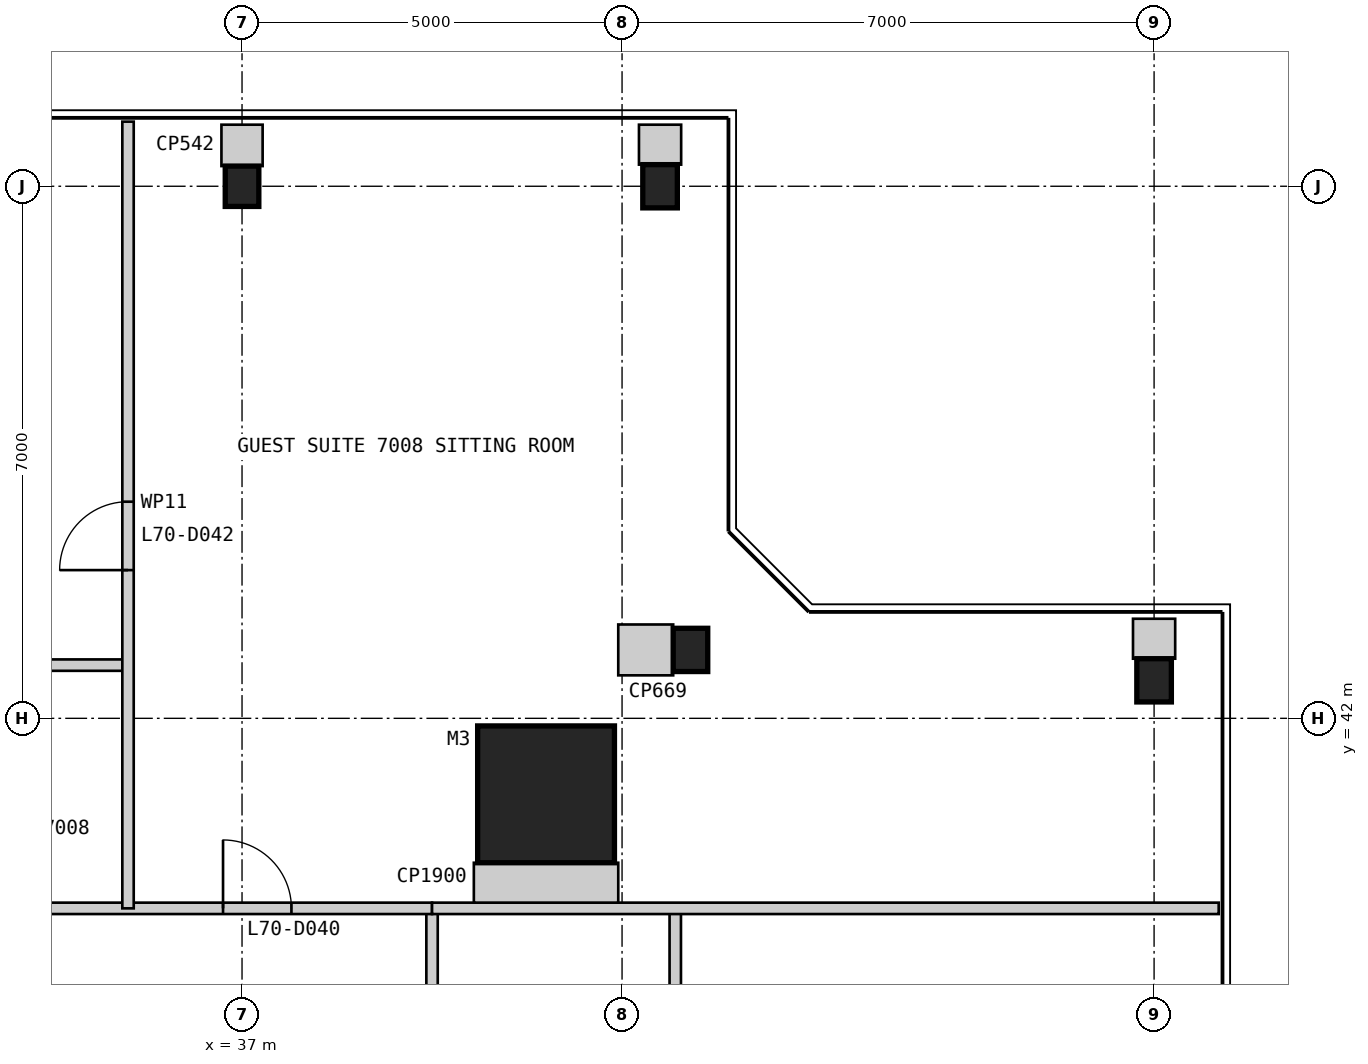
"""IFC4 building model, lengths in metres.
Left out: names, types, materials, properties, quantities, classifications, styles, units other than length and angle.
Written with IfcOpenShell. Run it as: python <this file> out.ifc"""

import sys

from ifc_helpers import new_model, si_unit, direction, frame, frame_2d, origin, origin_2d, place, context, subcontext, project, spatial, rectangle, i_section, extrude, element, fill, save


model = new_model("IFC4")
c1 = context("Model", 3, precision=1e-05, world=origin(), true_north=direction((0.0, 1.0)))
c2 = subcontext(c1, "Body", "Model", "MODEL_VIEW")
j1 = project(units=[si_unit("LENGTHUNIT", "METRE"), si_unit("PLANEANGLEUNIT", "RADIAN")], contexts=[c1])
p1 = place(None, origin())
s1 = spatial("IfcSite", under=j1, at=p1, CompositionType="ELEMENT")
p2 = place(p1, origin())
s2 = spatial("IfcBuilding", under=s1, at=p2, CompositionType="ELEMENT")
p3 = place(p2, frame((0.0, 0.0, 290.0)))
s3 = spatial("IfcBuildingStorey", under=s2, at=p3, CompositionType="ELEMENT", Elevation=290.0)
p4 = place(p3, frame((41.0, 41.0, 0.0), z_axis=(0.0, 0.0, 1.0), x_axis=(1.0, 0.0, 0.0)))
e1 = element("IfcColumn", 1, at=p4, inside=s3, PredefinedType="COLUMN", context=c2, shape_type="SweptSolid", body=[
    extrude(rectangle(XDim=1.8, YDim=1.8, at=origin_2d()), origin(), (0.0, 0.0, 1.0), 3.4),
])
for number, where, z_axis, x_axis in (
    (2, (49.0, 42.5, 0.0), (0.0, 0.0, 1.0), (1.0, 0.0, 0.0)),
    (3, (42.9, 42.9, 0.0), (0.0, 0.0, 1.0), (1.0, 0.0, 0.0)),
    (4, (42.5, 49.0, 0.0), (0.0, 0.0, 1.0), (1.0, 0.0, 0.0)),
):
    element("IfcColumn", number, at=place(p3, frame(where, z_axis=z_axis, x_axis=x_axis)), inside=s3, PredefinedType="COLUMN", context=c2, shape_type="SweptSolid", body=[
        extrude(i_section(OverallWidth=0.455, OverallDepth=0.569, WebThickness=0.078, FlangeThickness=0.125, at=origin_2d()), origin(), (0.0, 0.0, 1.0), 3.4),
    ])
p5 = place(p3, frame((37.0, 49.0, 0.0), z_axis=(0.0, 0.0, 1.0), x_axis=(1.0, 0.0, 0.0)))
e5 = element("IfcColumn", 5, at=p5, inside=s3, PredefinedType="COLUMN", context=c2, shape_type="SweptSolid", body=[
    extrude(i_section(OverallWidth=0.442, OverallDepth=0.531, WebThickness=0.066, FlangeThickness=0.106, at=origin_2d()), origin(), (0.0, 0.0, 1.0), 3.4),
])
p6 = place(p3, frame((39.5, 10.5, 0.0), z_axis=(0.0, 0.0, 1.0), x_axis=(0.0, 1.0, 0.0)))
e6 = element("IfcWall", 6, at=p6, inside=s3, PredefinedType="PARTITIONING", context=c2, shape_type="SweptSolid", body=[
    extrude(rectangle(XDim=29.0, YDim=0.15, at=frame_2d((14.5, 0.0))), origin(), (0.0, 0.0, 1.0), 3.25),
])
p7 = place(p6, frame((2.775, 0.0, 0.0)))
e7 = element("IfcOpeningElement", 7, at=p7, cuts=e6, PredefinedType="OPENING", context=c2, shape_type="SweptSolid", body=[
    extrude(rectangle(XDim=0.9, YDim=2.1, at=frame_2d((0.45, 1.05))), frame((0.0, 0.085, 0.0), z_axis=(0.0, -1.0, 0.0), x_axis=(1.0, 0.0, 0.0)), (0.0, 0.0, 1.0), 0.17),
])
p8 = place(p6, frame((11.1, 0.0, 0.0)))
e8 = element("IfcOpeningElement", 8, at=p8, cuts=e6, PredefinedType="OPENING", context=c2, shape_type="SweptSolid", body=[
    extrude(rectangle(XDim=0.9, YDim=2.1, at=frame_2d((0.45, 1.05))), frame((0.0, 0.085, 0.0), z_axis=(0.0, -1.0, 0.0), x_axis=(1.0, 0.0, 0.0)), (0.0, 0.0, 1.0), 0.17),
])
p9 = place(p6, frame((17.2, 0.0, 0.0)))
e9 = element("IfcOpeningElement", 9, at=p9, cuts=e6, PredefinedType="OPENING", context=c2, shape_type="SweptSolid", body=[
    extrude(rectangle(XDim=1.0, YDim=2.1, at=frame_2d((0.5, 1.05))), frame((0.0, 0.085, 0.0), z_axis=(0.0, -1.0, 0.0), x_axis=(1.0, 0.0, 0.0)), (0.0, 0.0, 1.0), 0.17),
])
p10 = place(p6, frame((24.5, 0.0, 0.0)))
e10 = element("IfcOpeningElement", 10, at=p10, cuts=e6, PredefinedType="OPENING", context=c2, shape_type="SweptSolid", body=[
    extrude(rectangle(XDim=0.9, YDim=2.1, at=frame_2d((0.45, 1.05))), frame((0.0, 0.085, 0.0), z_axis=(0.0, -1.0, 0.0), x_axis=(1.0, 0.0, 0.0)), (0.0, 0.0, 1.0), 0.17),
])
p11 = place(p3, frame((42.7, 36.5, 0.0), z_axis=(0.0, 0.0, 1.0), x_axis=(0.0, 1.0, 0.0)))
e11 = element("IfcWall", 11, at=p11, inside=s3, PredefinedType="PARTITIONING", context=c2, shape_type="SweptSolid", body=[
    extrude(rectangle(XDim=3.0, YDim=0.15, at=frame_2d((1.5, 0.0))), origin(), (0.0, 0.0, 1.0), 3.25),
])
p12 = place(p3, frame((39.5, 39.5, 0.0), z_axis=(0.0, 0.0, 1.0), x_axis=(-1.0, 0.0, 0.0)))
e12 = element("IfcWall", 12, at=p12, inside=s3, PredefinedType="PARTITIONING", context=c2, shape_type="SweptSolid", body=[
    extrude(rectangle(XDim=29.0, YDim=0.15, at=frame_2d((14.5, 0.0))), origin(), (0.0, 0.0, 1.0), 3.25),
])
p13 = place(p12, frame((1.85, 0.0, 0.0)))
e13 = element("IfcOpeningElement", 13, at=p13, cuts=e12, PredefinedType="OPENING", context=c2, shape_type="SweptSolid", body=[
    extrude(rectangle(XDim=0.9, YDim=2.1, at=frame_2d((0.45, 1.05))), frame((0.0, 0.085, 0.0), z_axis=(0.0, -1.0, 0.0), x_axis=(1.0, 0.0, 0.0)), (0.0, 0.0, 1.0), 0.17),
])
p14 = place(p12, frame((11.5, 0.0, 0.0)))
e14 = element("IfcOpeningElement", 14, at=p14, cuts=e12, PredefinedType="OPENING", context=c2, shape_type="SweptSolid", body=[
    extrude(rectangle(XDim=0.9, YDim=2.1, at=frame_2d((0.45, 1.05))), frame((0.0, 0.085, 0.0), z_axis=(0.0, -1.0, 0.0), x_axis=(1.0, 0.0, 0.0)), (0.0, 0.0, 1.0), 0.17),
])
p15 = place(p12, frame((24.1, 0.0, 0.0)))
e15 = element("IfcOpeningElement", 15, at=p15, cuts=e12, PredefinedType="OPENING", context=c2, shape_type="SweptSolid", body=[
    extrude(rectangle(XDim=0.9, YDim=2.1, at=frame_2d((0.45, 1.05))), frame((0.0, 0.085, 0.0), z_axis=(0.0, -1.0, 0.0), x_axis=(1.0, 0.0, 0.0)), (0.0, 0.0, 1.0), 0.17),
])
p16 = place(p3, frame((49.85, 39.5, 0.0), z_axis=(0.0, 0.0, 1.0), x_axis=(-1.0, 0.0, 0.0)))
e16 = element("IfcWall", 16, at=p16, inside=s3, PredefinedType="PARTITIONING", context=c2, shape_type="SweptSolid", body=[
    extrude(rectangle(XDim=10.35, YDim=0.15, at=frame_2d((5.175, 0.0))), origin(), (0.0, 0.0, 1.0), 3.25),
])
p17 = place(p3, frame((35.5, 42.7, 0.0), z_axis=(0.0, 0.0, 1.0), x_axis=(-1.0, 0.0, 0.0)))
e17 = element("IfcWall", 17, at=p17, inside=s3, PredefinedType="PARTITIONING", context=c2, shape_type="SweptSolid", body=[
    extrude(rectangle(XDim=3.0, YDim=0.15, at=frame_2d((1.5, 0.0))), origin(), (0.0, 0.0, 1.0), 3.25),
])
p18 = place(p3, frame((35.5, 49.85, 0.0), z_axis=(0.0, 0.0, 1.0), x_axis=(0.0, -1.0, 0.0)))
e18 = element("IfcWall", 18, at=p18, inside=s3, PredefinedType="PARTITIONING", context=c2, shape_type="SweptSolid", body=[
    extrude(rectangle(XDim=10.35, YDim=0.15, at=frame_2d((5.175, 0.0))), origin(), (0.0, 0.0, 1.0), 3.25),
])
p19 = place(p18, frame((5.0, 0.0, 0.0)))
e19 = element("IfcOpeningElement", 19, at=p19, cuts=e18, PredefinedType="OPENING", context=c2, shape_type="SweptSolid", body=[
    extrude(rectangle(XDim=0.9, YDim=2.1, at=frame_2d((0.45, 1.05))), frame((0.0, 0.085, 0.0), z_axis=(0.0, -1.0, 0.0), x_axis=(1.0, 0.0, 0.0)), (0.0, 0.0, 1.0), 0.17),
])
p20 = place(p3, frame((41.0, 39.575, 0.0), z_axis=(0.0, 0.0, 1.0), x_axis=(0.0, 1.0, 0.0)))
e20 = element("IfcWall", 20, at=p20, inside=s3, PredefinedType="PARTITIONING", context=c2, shape_type="SweptSolid", body=[
    extrude(rectangle(XDim=0.525, YDim=1.9, at=frame_2d((0.263, 0.0))), origin(), (0.0, 0.0, 1.0), 3.25),
])
p21 = place(p3, frame((49.0, 43.31, 0.0), z_axis=(0.0, 0.0, 1.0), x_axis=(0.0, -1.0, 0.0)))
e21 = element("IfcWall", 21, at=p21, inside=s3, PredefinedType="PARTITIONING", context=c2, shape_type="SweptSolid", body=[
    extrude(rectangle(XDim=0.526, YDim=0.555, at=frame_2d((0.263, 0.0))), origin(), (0.0, 0.0, 1.0), 3.25),
])
p22 = place(p3, frame((41.95, 42.9, 0.0), z_axis=(0.0, 0.0, 1.0), x_axis=(1.0, 0.0, 0.0)))
e22 = element("IfcWall", 22, at=p22, inside=s3, PredefinedType="PARTITIONING", context=c2, shape_type="SweptSolid", body=[
    extrude(rectangle(XDim=0.723, YDim=0.669, at=frame_2d((0.361, 0.0))), origin(), (0.0, 0.0, 1.0), 3.25),
])
p23 = place(p3, frame((42.5, 49.81, 0.0), z_axis=(0.0, 0.0, 1.0), x_axis=(0.0, -1.0, 0.0)))
e23 = element("IfcWall", 23, at=p23, inside=s3, PredefinedType="PARTITIONING", context=c2, shape_type="SweptSolid", body=[
    extrude(rectangle(XDim=0.526, YDim=0.555, at=frame_2d((0.263, 0.0))), origin(), (0.0, 0.0, 1.0), 3.25),
])
p24 = place(p3, frame((37.0, 49.81, 0.0), z_axis=(0.0, 0.0, 1.0), x_axis=(0.0, -1.0, 0.0)))
e24 = element("IfcWall", 24, at=p24, inside=s3, PredefinedType="PARTITIONING", context=c2, shape_type="SweptSolid", body=[
    extrude(rectangle(XDim=0.545, YDim=0.542, at=frame_2d((0.272, 0.0))), origin(), (0.0, 0.0, 1.0), 3.25),
])
p25 = place(p13, frame((0.9, 0.0, 0.0), z_axis=(0.0, 0.0, 1.0), x_axis=(-1.0, 0.0, 0.0)))
e25 = element("IfcDoor", 25, at=p25, inside=s3, OperationType="SINGLE_SWING_LEFT", PredefinedType="DOOR", context=c2, shape_type="SweptSolid", body=[
    extrude(rectangle(XDim=0.9, YDim=2.1, at=frame_2d((0.45, 1.05))), frame((0.0, 0.025, 0.0), z_axis=(0.0, -1.0, 0.0), x_axis=(1.0, 0.0, 0.0)), (0.0, 0.0, 1.0), 0.05),
])
fill(e13, e25)
p26 = place(p19, frame((0.9, 0.0, 0.0), z_axis=(0.0, 0.0, 1.0), x_axis=(-1.0, 0.0, 0.0)))
e26 = element("IfcDoor", 26, at=p26, inside=s3, OperationType="SINGLE_SWING_LEFT", PredefinedType="DOOR", context=c2, shape_type="SweptSolid", body=[
    extrude(rectangle(XDim=0.9, YDim=2.1, at=frame_2d((0.45, 1.05))), frame((0.0, 0.025, 0.0), z_axis=(0.0, -1.0, 0.0), x_axis=(1.0, 0.0, 0.0)), (0.0, 0.0, 1.0), 0.05),
])
fill(e19, e26)
save(model, sys.argv[1])
